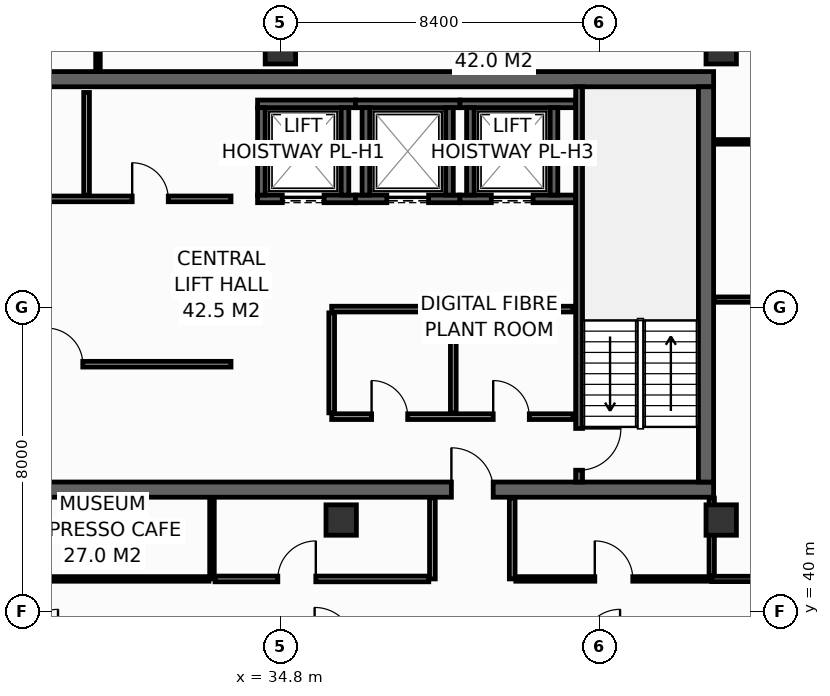
"""IFC4 building model, lengths in metres.
Left out: names, types, materials, properties, quantities, classifications, styles, units other than length and angle.
Written with IfcOpenShell. Run it as: python <this file> out.ifc"""

import sys

from ifc_helpers import new_model, si_unit, direction, frame, frame_2d, origin, origin_2d, place, context, subcontext, project, spatial, rectangle, hollow_rectangle, extrude, element, fill, save


model = new_model("IFC4")
c1 = context("Model", 3, precision=1e-05, world=origin(), true_north=direction((0.0, 1.0)))
c2 = subcontext(c1, "Body", "Model", "MODEL_VIEW")
j1 = project(units=[si_unit("LENGTHUNIT", "METRE"), si_unit("PLANEANGLEUNIT", "RADIAN")], contexts=[c1])
p1 = place(None, origin())
s1 = spatial("IfcSite", under=j1, at=p1, CompositionType="ELEMENT")
p2 = place(p1, origin())
s2 = spatial("IfcBuilding", under=s1, at=p2, CompositionType="ELEMENT")
p3 = place(p2, frame((0.0, 0.0, 257.2)))
s3 = spatial("IfcBuildingStorey", under=s2, at=p3, CompositionType="ELEMENT", Elevation=257.2)
p4 = place(p3, frame((13.7, 43.2, 0.0), z_axis=(0.0, 0.0, 1.0), x_axis=(1.0, 0.0, 0.0)))
e1 = element("IfcWall", 1, at=p4, inside=s3, PredefinedType="SHEAR", context=c2, shape_type="SweptSolid", body=[
    extrude(rectangle(XDim=32.5, YDim=0.4, at=frame_2d((16.25, 0.0))), origin(), (0.0, 0.0, 1.0), 3.55),
])
p5 = place(p4, frame((5.4, 0.0, 0.0)))
e2 = element("IfcOpeningElement", 2, at=p5, cuts=e1, PredefinedType="OPENING", context=c2, shape_type="SweptSolid", body=[
    extrude(rectangle(XDim=1.1, YDim=2.15, at=frame_2d((0.55, 1.075))), frame((0.0, 0.21, 0.0), z_axis=(0.0, -1.0, 0.0), x_axis=(1.0, 0.0, 0.0)), (0.0, 0.0, 1.0), 0.42),
])
p6 = place(p4, frame((25.6, 0.0, 0.0)))
e3 = element("IfcOpeningElement", 3, at=p6, cuts=e1, PredefinedType="OPENING", context=c2, shape_type="SweptSolid", body=[
    extrude(rectangle(XDim=1.1, YDim=2.15, at=frame_2d((0.55, 1.075))), frame((0.0, 0.21, 0.0), z_axis=(0.0, -1.0, 0.0), x_axis=(1.0, 0.0, 0.0)), (0.0, 0.0, 1.0), 0.42),
])
p7 = place(p3, frame((13.7, 54.0, 0.0), z_axis=(0.0, 0.0, 1.0), x_axis=(1.0, 0.0, 0.0)))
e4 = element("IfcWall", 4, at=p7, inside=s3, PredefinedType="SHEAR", context=c2, shape_type="SweptSolid", body=[
    extrude(rectangle(XDim=32.5, YDim=0.4, at=frame_2d((16.25, 0.0))), origin(), (0.0, 0.0, 1.0), 3.55),
])
p8 = place(p3, frame((46.0, 43.4, 0.0), z_axis=(0.0, 0.0, 1.0), x_axis=(0.0, 1.0, 0.0)))
e5 = element("IfcWall", 5, at=p8, inside=s3, PredefinedType="SHEAR", context=c2, shape_type="SweptSolid", body=[
    extrude(rectangle(XDim=10.4, YDim=0.4, at=frame_2d((5.2, 0.0))), origin(), (0.0, 0.0, 1.0), 3.55),
])
for number, where, z_axis, x_axis in (
    (6, (34.8, 54.8, 0.0), (0.0, 0.0, 1.0), (1.0, 0.0, 0.0)),
    (7, (46.4, 54.8, 0.0), (0.0, 0.0, 1.0), (1.0, 0.0, 0.0)),
    (8, (36.4, 42.4, 0.0), (0.0, 0.0, 1.0), (1.0, 0.0, 0.0)),
    (9, (46.4, 42.4, 0.0), (0.0, 0.0, 1.0), (1.0, 0.0, 0.0)),
):
    element("IfcColumn", number, at=place(p3, frame(where, z_axis=z_axis, x_axis=x_axis)), inside=s3, PredefinedType="COLUMN", context=c2, shape_type="SweptSolid", body=[
        extrude(hollow_rectangle(XDim=0.8, YDim=0.8, WallThickness=0.036, at=origin_2d()), origin(), (0.0, 0.0, 1.0), 3.8),
    ])
p9 = place(p3, frame((34.2, 50.85, 0.0), z_axis=(0.0, 0.0, 1.0), x_axis=(1.0, 0.0, 0.0)))
e10 = element("IfcWall", 10, at=p9, inside=s3, PredefinedType="SHEAR", context=c2, shape_type="SweptSolid", body=[
    extrude(rectangle(XDim=2.575, YDim=0.2, at=frame_2d((1.288, 0.0))), origin(), (0.0, 0.0, 1.0), 3.55),
])
p10 = place(p9, frame((0.65, 0.0, 0.0)))
e11 = element("IfcOpeningElement", 11, at=p10, cuts=e10, PredefinedType="OPENING", context=c2, shape_type="SweptSolid", body=[
    extrude(rectangle(XDim=1.1, YDim=2.2, at=frame_2d((0.55, 1.1))), frame((0.0, 0.11, 0.0), z_axis=(0.0, -1.0, 0.0), x_axis=(1.0, 0.0, 0.0)), (0.0, 0.0, 1.0), 0.22),
])
p11 = place(p3, frame((34.2, 53.35, 0.0), z_axis=(0.0, 0.0, 1.0), x_axis=(1.0, 0.0, 0.0)))
e12 = element("IfcWall", 12, at=p11, inside=s3, PredefinedType="SHEAR", context=c2, shape_type="SweptSolid", body=[
    extrude(rectangle(XDim=2.575, YDim=0.2, at=frame_2d((1.288, 0.0))), origin(), (0.0, 0.0, 1.0), 3.55),
])
for number, where, z_axis, x_axis in (
    (13, (34.3, 50.95, 0.0), (0.0, 0.0, 1.0), (0.0, 1.0, 0.0)),
    (14, (36.5, 50.95, 0.0), (0.0, 0.0, 1.0), (0.0, 1.0, 0.0)),
):
    element("IfcWall", number, at=place(p3, frame(where, z_axis=z_axis, x_axis=x_axis)), inside=s3, PredefinedType="SHEAR", context=c2, shape_type="SweptSolid", body=[
        extrude(rectangle(XDim=2.3, YDim=0.2, at=frame_2d((1.15, 0.0))), origin(), (0.0, 0.0, 1.0), 3.55),
    ])
p12 = place(p3, frame((36.775, 50.85, 0.0), z_axis=(0.0, 0.0, 1.0), x_axis=(1.0, 0.0, 0.0)))
e15 = element("IfcWall", 15, at=p12, inside=s3, PredefinedType="SHEAR", context=c2, shape_type="SweptSolid", body=[
    extrude(rectangle(XDim=2.75, YDim=0.2, at=frame_2d((1.375, 0.0))), origin(), (0.0, 0.0, 1.0), 3.55),
])
p13 = place(p12, frame((0.825, 0.0, 0.0)))
e16 = element("IfcOpeningElement", 16, at=p13, cuts=e15, PredefinedType="OPENING", context=c2, shape_type="SweptSolid", body=[
    extrude(rectangle(XDim=1.1, YDim=2.2, at=frame_2d((0.55, 1.1))), frame((0.0, 0.11, 0.0), z_axis=(0.0, -1.0, 0.0), x_axis=(1.0, 0.0, 0.0)), (0.0, 0.0, 1.0), 0.22),
])
p14 = place(p3, frame((36.775, 53.35, 0.0), z_axis=(0.0, 0.0, 1.0), x_axis=(1.0, 0.0, 0.0)))
e17 = element("IfcWall", 17, at=p14, inside=s3, PredefinedType="SHEAR", context=c2, shape_type="SweptSolid", body=[
    extrude(rectangle(XDim=2.75, YDim=0.2, at=frame_2d((1.375, 0.0))), origin(), (0.0, 0.0, 1.0), 3.55),
])
for number, where, z_axis, x_axis in (
    (18, (37.05, 50.95, 0.0), (0.0, 0.0, 1.0), (0.0, 1.0, 0.0)),
    (19, (39.25, 50.95, 0.0), (0.0, 0.0, 1.0), (0.0, 1.0, 0.0)),
):
    element("IfcWall", number, at=place(p3, frame(where, z_axis=z_axis, x_axis=x_axis)), inside=s3, PredefinedType="SHEAR", context=c2, shape_type="SweptSolid", body=[
        extrude(rectangle(XDim=2.3, YDim=0.2, at=frame_2d((1.15, 0.0))), origin(), (0.0, 0.0, 1.0), 3.55),
    ])
p15 = place(p3, frame((39.525, 50.85, 0.0), z_axis=(0.0, 0.0, 1.0), x_axis=(1.0, 0.0, 0.0)))
e20 = element("IfcWall", 20, at=p15, inside=s3, PredefinedType="SHEAR", context=c2, shape_type="SweptSolid", body=[
    extrude(rectangle(XDim=3.045, YDim=0.2, at=frame_2d((1.522, 0.0))), origin(), (0.0, 0.0, 1.0), 3.55),
])
p16 = place(p15, frame((0.825, 0.0, 0.0)))
e21 = element("IfcOpeningElement", 21, at=p16, cuts=e20, PredefinedType="OPENING", context=c2, shape_type="SweptSolid", body=[
    extrude(rectangle(XDim=1.1, YDim=2.2, at=frame_2d((0.55, 1.1))), frame((0.0, 0.11, 0.0), z_axis=(0.0, -1.0, 0.0), x_axis=(1.0, 0.0, 0.0)), (0.0, 0.0, 1.0), 0.22),
])
p17 = place(p3, frame((39.525, 53.35, 0.0), z_axis=(0.0, 0.0, 1.0), x_axis=(1.0, 0.0, 0.0)))
e22 = element("IfcWall", 22, at=p17, inside=s3, PredefinedType="SHEAR", context=c2, shape_type="SweptSolid", body=[
    extrude(rectangle(XDim=3.045, YDim=0.2, at=frame_2d((1.522, 0.0))), origin(), (0.0, 0.0, 1.0), 3.55),
])
for number, where, z_axis, x_axis in (
    (23, (39.8, 50.95, 0.0), (0.0, 0.0, 1.0), (0.0, 1.0, 0.0)),
    (24, (42.0, 50.95, 0.0), (0.0, 0.0, 1.0), (0.0, 1.0, 0.0)),
):
    element("IfcWall", number, at=place(p3, frame(where, z_axis=z_axis, x_axis=x_axis)), inside=s3, PredefinedType="SHEAR", context=c2, shape_type="SweptSolid", body=[
        extrude(rectangle(XDim=2.3, YDim=0.2, at=frame_2d((1.15, 0.0))), origin(), (0.0, 0.0, 1.0), 3.55),
    ])
p18 = place(p3, frame((42.66, 53.8, 0.0), z_axis=(0.0, 0.0, 1.0), x_axis=(0.0, -1.0, 0.0)))
e25 = element("IfcWall", 25, at=p18, inside=s3, PredefinedType="SHEAR", context=c2, shape_type="SweptSolid", body=[
    extrude(rectangle(XDim=10.4, YDim=0.18, at=frame_2d((5.2, 0.0))), origin(), (0.0, 0.0, 1.0), 3.55),
])
p19 = place(p18, frame((8.99, 0.0, 0.0)))
e26 = element("IfcOpeningElement", 26, at=p19, cuts=e25, PredefinedType="OPENING", context=c2, shape_type="SweptSolid", body=[
    extrude(rectangle(XDim=1.1, YDim=2.15, at=frame_2d((0.55, 1.075))), frame((0.0, 0.1, 0.0), z_axis=(0.0, -1.0, 0.0), x_axis=(1.0, 0.0, 0.0)), (0.0, 0.0, 1.0), 0.2),
])
p20 = place(p3, frame((36.15, 45.12, 0.0), z_axis=(0.0, 0.0, 1.0), x_axis=(1.0, 0.0, 0.0)))
e27 = element("IfcWall", 27, at=p20, inside=s3, PredefinedType="PARTITIONING", context=c2, shape_type="SweptSolid", body=[
    extrude(rectangle(XDim=6.35, YDim=0.15, at=frame_2d((3.175, 0.0))), origin(), (0.0, 0.0, 1.0), 3.55),
])
p21 = place(p20, frame((1.05, 0.0, 0.0)))
e28 = element("IfcOpeningElement", 28, at=p21, cuts=e27, PredefinedType="OPENING", context=c2, shape_type="SweptSolid", body=[
    extrude(rectangle(XDim=0.95, YDim=2.15, at=frame_2d((0.475, 1.075))), frame((0.0, 0.085, 0.0), z_axis=(0.0, -1.0, 0.0), x_axis=(1.0, 0.0, 0.0)), (0.0, 0.0, 1.0), 0.17),
])
p22 = place(p20, frame((4.25, 0.0, 0.0)))
e29 = element("IfcOpeningElement", 29, at=p22, cuts=e27, PredefinedType="OPENING", context=c2, shape_type="SweptSolid", body=[
    extrude(rectangle(XDim=0.95, YDim=2.15, at=frame_2d((0.475, 1.075))), frame((0.0, 0.085, 0.0), z_axis=(0.0, -1.0, 0.0), x_axis=(1.0, 0.0, 0.0)), (0.0, 0.0, 1.0), 0.17),
])
p23 = place(p3, frame((36.15, 47.95, 0.0), z_axis=(0.0, 0.0, 1.0), x_axis=(1.0, 0.0, 0.0)))
e30 = element("IfcWall", 30, at=p23, inside=s3, PredefinedType="PARTITIONING", context=c2, shape_type="SweptSolid", body=[
    extrude(rectangle(XDim=6.35, YDim=0.15, at=frame_2d((3.175, 0.0))), origin(), (0.0, 0.0, 1.0), 3.55),
])
for number, where, z_axis, x_axis in (
    (31, (36.15, 45.22, 0.0), (0.0, 0.0, 1.0), (0.0, 1.0, 0.0)),
    (32, (39.35, 45.22, 0.0), (0.0, 0.0, 1.0), (0.0, 1.0, 0.0)),
):
    element("IfcWall", number, at=place(p3, frame(where, z_axis=z_axis, x_axis=x_axis)), inside=s3, PredefinedType="PARTITIONING", context=c2, shape_type="SweptSolid", body=[
        extrude(rectangle(XDim=2.63, YDim=0.15, at=frame_2d((1.315, 0.0))), origin(), (0.0, 0.0, 1.0), 3.55),
    ])
p24 = place(p3, frame((25.85, 50.85, 0.0), z_axis=(0.0, 0.0, 1.0), x_axis=(1.0, 0.0, 0.0)))
e33 = element("IfcWall", 33, at=p24, inside=s3, PredefinedType="PARTITIONING", context=c2, shape_type="SweptSolid", body=[
    extrude(rectangle(XDim=7.65, YDim=0.15, at=frame_2d((3.825, 0.0))), origin(), (0.0, 0.0, 1.0), 3.55),
])
p25 = place(p24, frame((1.25, 0.0, 0.0)))
e34 = element("IfcOpeningElement", 34, at=p25, cuts=e33, PredefinedType="OPENING", context=c2, shape_type="SweptSolid", body=[
    extrude(rectangle(XDim=0.95, YDim=2.15, at=frame_2d((0.475, 1.075))), frame((0.0, 0.085, 0.0), z_axis=(0.0, -1.0, 0.0), x_axis=(1.0, 0.0, 0.0)), (0.0, 0.0, 1.0), 0.17),
])
p26 = place(p24, frame((5.05, 0.0, 0.0)))
e35 = element("IfcOpeningElement", 35, at=p26, cuts=e33, PredefinedType="OPENING", context=c2, shape_type="SweptSolid", body=[
    extrude(rectangle(XDim=0.95, YDim=2.15, at=frame_2d((0.475, 1.075))), frame((0.0, 0.085, 0.0), z_axis=(0.0, -1.0, 0.0), x_axis=(1.0, 0.0, 0.0)), (0.0, 0.0, 1.0), 0.17),
])
p27 = place(p3, frame((29.7, 50.95, 0.0), z_axis=(0.0, 0.0, 1.0), x_axis=(0.0, 1.0, 0.0)))
e36 = element("IfcWall", 36, at=p27, inside=s3, PredefinedType="PARTITIONING", context=c2, shape_type="SweptSolid", body=[
    extrude(rectangle(XDim=2.7, YDim=0.15, at=frame_2d((1.35, 0.0))), origin(), (0.0, 0.0, 1.0), 3.55),
])
p28 = place(p3, frame((25.85, 46.5, 0.0), z_axis=(0.0, 0.0, 1.0), x_axis=(1.0, 0.0, 0.0)))
e37 = element("IfcWall", 37, at=p28, inside=s3, PredefinedType="PARTITIONING", context=c2, shape_type="SweptSolid", body=[
    extrude(rectangle(XDim=7.65, YDim=0.15, at=frame_2d((3.825, 0.0))), origin(), (0.0, 0.0, 1.0), 3.55),
])
p29 = place(p28, frame((2.8, 0.0, 0.0)))
e38 = element("IfcOpeningElement", 38, at=p29, cuts=e37, PredefinedType="OPENING", context=c2, shape_type="SweptSolid", body=[
    extrude(rectangle(XDim=0.95, YDim=2.15, at=frame_2d((0.475, 1.075))), frame((0.0, 0.085, 0.0), z_axis=(0.0, -1.0, 0.0), x_axis=(1.0, 0.0, 0.0)), (0.0, 0.0, 1.0), 0.17),
])
p30 = place(p3, frame((46.15, 40.85, 0.0), z_axis=(0.0, 0.0, 1.0), x_axis=(1.0, 0.0, 0.0)))
e39 = element("IfcWall", 39, at=p30, inside=s3, PredefinedType="PARTITIONING", context=c2, shape_type="SweptSolid", body=[
    extrude(rectangle(XDim=4.05, YDim=0.14, at=frame_2d((2.025, 0.0))), origin(), (0.0, 0.0, 1.0), 3.55),
])
p31 = place(p3, frame((46.15, 40.94, 0.0), z_axis=(0.0, 0.0, 1.0), x_axis=(0.0, 1.0, 0.0)))
e40 = element("IfcWall", 40, at=p31, inside=s3, PredefinedType="PARTITIONING", context=c2, shape_type="SweptSolid", body=[
    extrude(rectangle(XDim=2.04, YDim=0.14, at=frame_2d((1.02, 0.0))), origin(), (0.0, 0.0, 1.0), 3.55),
])
p32 = place(p3, frame((46.22, 48.2, 0.0), z_axis=(0.0, 0.0, 1.0), x_axis=(1.0, 0.0, 0.0)))
e41 = element("IfcWall", 41, at=p32, inside=s3, PredefinedType="PARTITIONING", context=c2, shape_type="SweptSolid", body=[
    extrude(rectangle(XDim=3.98, YDim=0.14, at=frame_2d((1.99, 0.0))), origin(), (0.0, 0.0, 1.0), 3.55),
])
p33 = place(p3, frame((46.22, 52.35, 0.0), z_axis=(0.0, 0.0, 1.0), x_axis=(1.0, 0.0, 0.0)))
e42 = element("IfcWall", 42, at=p33, inside=s3, PredefinedType="PARTITIONING", context=c2, shape_type="SweptSolid", body=[
    extrude(rectangle(XDim=3.98, YDim=0.12, at=frame_2d((1.99, 0.0))), origin(), (0.0, 0.0, 1.0), 3.55),
])
p34 = place(p3, frame((30.0, 54.22, 0.0), z_axis=(0.0, 0.0, 1.0), x_axis=(0.0, 1.0, 0.0)))
e43 = element("IfcWall", 43, at=p34, inside=s3, PredefinedType="PARTITIONING", context=c2, shape_type="SweptSolid", body=[
    extrude(rectangle(XDim=1.775, YDim=0.12, at=frame_2d((0.888, 0.0))), origin(), (0.0, 0.0, 1.0), 2.935),
])
for number, where, z_axis, x_axis in (
    (44, (38.8, 40.85, 0.0), (0.0, 0.0, 1.0), (0.0, 1.0, 0.0)),
    (45, (40.9, 40.85, 0.0), (0.0, 0.0, 1.0), (0.0, 1.0, 0.0)),
):
    element("IfcWall", number, at=place(p3, frame(where, z_axis=z_axis, x_axis=x_axis)), inside=s3, PredefinedType="PARTITIONING", context=c2, shape_type="SweptSolid", body=[
        extrude(rectangle(XDim=2.13, YDim=0.15, at=frame_2d((1.065, 0.0))), origin(), (0.0, 0.0, 1.0), 3.55),
    ])
p35 = place(p3, frame((33.0, 40.85, 0.0), z_axis=(0.0, 0.0, 1.0), x_axis=(0.0, 1.0, 0.0)))
e46 = element("IfcWall", 46, at=p35, inside=s3, PredefinedType="PARTITIONING", context=c2, shape_type="SweptSolid", body=[
    extrude(rectangle(XDim=2.13, YDim=0.12, at=frame_2d((1.065, 0.0))), origin(), (0.0, 0.0, 1.0), 2.947),
])
p36 = place(p3, frame((20.795, 40.85, 0.0), z_axis=(0.0, 0.0, 1.0), x_axis=(1.0, 0.0, 0.0)))
e47 = element("IfcWall", 47, at=p36, inside=s3, PredefinedType="PARTITIONING", context=c2, shape_type="SweptSolid", body=[
    extrude(rectangle(XDim=12.125, YDim=0.12, at=frame_2d((6.062, 0.0))), origin(), (0.0, 0.0, 1.0), 2.947),
])
p37 = place(p36, frame((5.562, 0.0, 0.0)))
e48 = element("IfcOpeningElement", 48, at=p37, cuts=e47, PredefinedType="OPENING", context=c2, shape_type="SweptSolid", body=[
    extrude(rectangle(XDim=1.0, YDim=2.15, at=frame_2d((0.5, 1.075))), frame((0.0, 0.07, 0.0), z_axis=(0.0, -1.0, 0.0), x_axis=(1.0, 0.0, 0.0)), (0.0, 0.0, 1.0), 0.14),
])
p38 = place(p3, frame((33.08, 40.85, 0.0), z_axis=(0.0, 0.0, 1.0), x_axis=(1.0, 0.0, 0.0)))
e49 = element("IfcWall", 49, at=p38, inside=s3, PredefinedType="PARTITIONING", context=c2, shape_type="SweptSolid", body=[
    extrude(rectangle(XDim=5.625, YDim=0.15, at=frame_2d((2.812, 0.0))), origin(), (0.0, 0.0, 1.0), 2.947),
])
p39 = place(p38, frame((1.652, 0.0, 0.0)))
e50 = element("IfcOpeningElement", 50, at=p39, cuts=e49, PredefinedType="OPENING", context=c2, shape_type="SweptSolid", body=[
    extrude(rectangle(XDim=1.0, YDim=2.15, at=frame_2d((0.5, 1.075))), frame((0.0, 0.085, 0.0), z_axis=(0.0, -1.0, 0.0), x_axis=(1.0, 0.0, 0.0)), (0.0, 0.0, 1.0), 0.17),
])
p40 = place(p3, frame((40.995, 40.85, 0.0), z_axis=(0.0, 0.0, 1.0), x_axis=(1.0, 0.0, 0.0)))
e51 = element("IfcWall", 51, at=p40, inside=s3, PredefinedType="PARTITIONING", context=c2, shape_type="SweptSolid", body=[
    extrude(rectangle(XDim=5.155, YDim=0.12, at=frame_2d((2.577, 0.0))), origin(), (0.0, 0.0, 1.0), 3.55),
])
p41 = place(p40, frame((2.078, 0.0, 0.0)))
e52 = element("IfcOpeningElement", 52, at=p41, cuts=e51, PredefinedType="OPENING", context=c2, shape_type="SweptSolid", body=[
    extrude(rectangle(XDim=1.0, YDim=2.15, at=frame_2d((0.5, 1.075))), frame((0.0, 0.07, 0.0), z_axis=(0.0, -1.0, 0.0), x_axis=(1.0, 0.0, 0.0)), (0.0, 0.0, 1.0), 0.14),
])
p42 = place(p10, origin())
e53 = element("IfcDoor", 53, at=p42, inside=s3, OperationType="SLIDING_TO_LEFT", PredefinedType="DOOR", context=c2, shape_type="SweptSolid", body=[
    extrude(rectangle(XDim=1.1, YDim=2.2, at=frame_2d((0.55, 1.1))), frame((0.0, 0.025, 0.0), z_axis=(0.0, -1.0, 0.0), x_axis=(1.0, 0.0, 0.0)), (0.0, 0.0, 1.0), 0.05),
])
fill(e11, e53)
p43 = place(p13, origin())
e54 = element("IfcDoor", 54, at=p43, inside=s3, OperationType="SLIDING_TO_LEFT", PredefinedType="DOOR", context=c2, shape_type="SweptSolid", body=[
    extrude(rectangle(XDim=1.1, YDim=2.2, at=frame_2d((0.55, 1.1))), frame((0.0, 0.025, 0.0), z_axis=(0.0, -1.0, 0.0), x_axis=(1.0, 0.0, 0.0)), (0.0, 0.0, 1.0), 0.05),
])
fill(e16, e54)
p44 = place(p16, origin())
e55 = element("IfcDoor", 55, at=p44, inside=s3, OperationType="SLIDING_TO_LEFT", PredefinedType="DOOR", context=c2, shape_type="SweptSolid", body=[
    extrude(rectangle(XDim=1.1, YDim=2.2, at=frame_2d((0.55, 1.1))), frame((0.0, 0.025, 0.0), z_axis=(0.0, -1.0, 0.0), x_axis=(1.0, 0.0, 0.0)), (0.0, 0.0, 1.0), 0.05),
])
fill(e21, e55)
p45 = place(p19, origin())
e56 = element("IfcDoor", 56, at=p45, inside=s3, OperationType="SINGLE_SWING_LEFT", PredefinedType="DOOR", context=c2, shape_type="SweptSolid", body=[
    extrude(rectangle(XDim=1.1, YDim=2.15, at=frame_2d((0.55, 1.075))), frame((0.0, 0.025, 0.0), z_axis=(0.0, -1.0, 0.0), x_axis=(1.0, 0.0, 0.0)), (0.0, 0.0, 1.0), 0.05),
])
fill(e26, e56)
p46 = place(p6, origin())
e57 = element("IfcDoor", 57, at=p46, inside=s3, OperationType="SINGLE_SWING_LEFT", PredefinedType="DOOR", context=c2, shape_type="SweptSolid", body=[
    extrude(rectangle(XDim=1.1, YDim=2.15, at=frame_2d((0.55, 1.075))), frame((0.0, 0.025, 0.0), z_axis=(0.0, -1.0, 0.0), x_axis=(1.0, 0.0, 0.0)), (0.0, 0.0, 1.0), 0.05),
])
fill(e3, e57)
p47 = place(p21, origin())
e58 = element("IfcDoor", 58, at=p47, inside=s3, OperationType="SINGLE_SWING_LEFT", PredefinedType="DOOR", context=c2, shape_type="SweptSolid", body=[
    extrude(rectangle(XDim=0.95, YDim=2.15, at=frame_2d((0.475, 1.075))), frame((0.0, 0.025, 0.0), z_axis=(0.0, -1.0, 0.0), x_axis=(1.0, 0.0, 0.0)), (0.0, 0.0, 1.0), 0.05),
])
fill(e28, e58)
p48 = place(p22, origin())
e59 = element("IfcDoor", 59, at=p48, inside=s3, OperationType="SINGLE_SWING_LEFT", PredefinedType="DOOR", context=c2, shape_type="SweptSolid", body=[
    extrude(rectangle(XDim=0.95, YDim=2.15, at=frame_2d((0.475, 1.075))), frame((0.0, 0.025, 0.0), z_axis=(0.0, -1.0, 0.0), x_axis=(1.0, 0.0, 0.0)), (0.0, 0.0, 1.0), 0.05),
])
fill(e29, e59)
p49 = place(p26, origin())
e60 = element("IfcDoor", 60, at=p49, inside=s3, OperationType="SINGLE_SWING_LEFT", PredefinedType="DOOR", context=c2, shape_type="SweptSolid", body=[
    extrude(rectangle(XDim=0.95, YDim=2.15, at=frame_2d((0.475, 1.075))), frame((0.0, 0.025, 0.0), z_axis=(0.0, -1.0, 0.0), x_axis=(1.0, 0.0, 0.0)), (0.0, 0.0, 1.0), 0.05),
])
fill(e35, e60)
p50 = place(p29, origin())
e61 = element("IfcDoor", 61, at=p50, inside=s3, OperationType="SINGLE_SWING_LEFT", PredefinedType="DOOR", context=c2, shape_type="SweptSolid", body=[
    extrude(rectangle(XDim=0.95, YDim=2.15, at=frame_2d((0.475, 1.075))), frame((0.0, 0.025, 0.0), z_axis=(0.0, -1.0, 0.0), x_axis=(1.0, 0.0, 0.0)), (0.0, 0.0, 1.0), 0.05),
])
fill(e38, e61)
p51 = place(p39, origin())
e62 = element("IfcDoor", 62, at=p51, inside=s3, OperationType="SINGLE_SWING_RIGHT", PredefinedType="DOOR", context=c2, shape_type="SweptSolid", body=[
    extrude(rectangle(XDim=1.0, YDim=2.15, at=frame_2d((0.5, 1.075))), frame((0.0, 0.025, 0.0), z_axis=(0.0, -1.0, 0.0), x_axis=(1.0, 0.0, 0.0)), (0.0, 0.0, 1.0), 0.05),
])
fill(e50, e62)
p52 = place(p41, origin())
e63 = element("IfcDoor", 63, at=p52, inside=s3, OperationType="SINGLE_SWING_LEFT", PredefinedType="DOOR", context=c2, shape_type="SweptSolid", body=[
    extrude(rectangle(XDim=1.0, YDim=2.15, at=frame_2d((0.5, 1.075))), frame((0.0, 0.025, 0.0), z_axis=(0.0, -1.0, 0.0), x_axis=(1.0, 0.0, 0.0)), (0.0, 0.0, 1.0), 0.05),
])
fill(e52, e63)
save(model, sys.argv[1])
